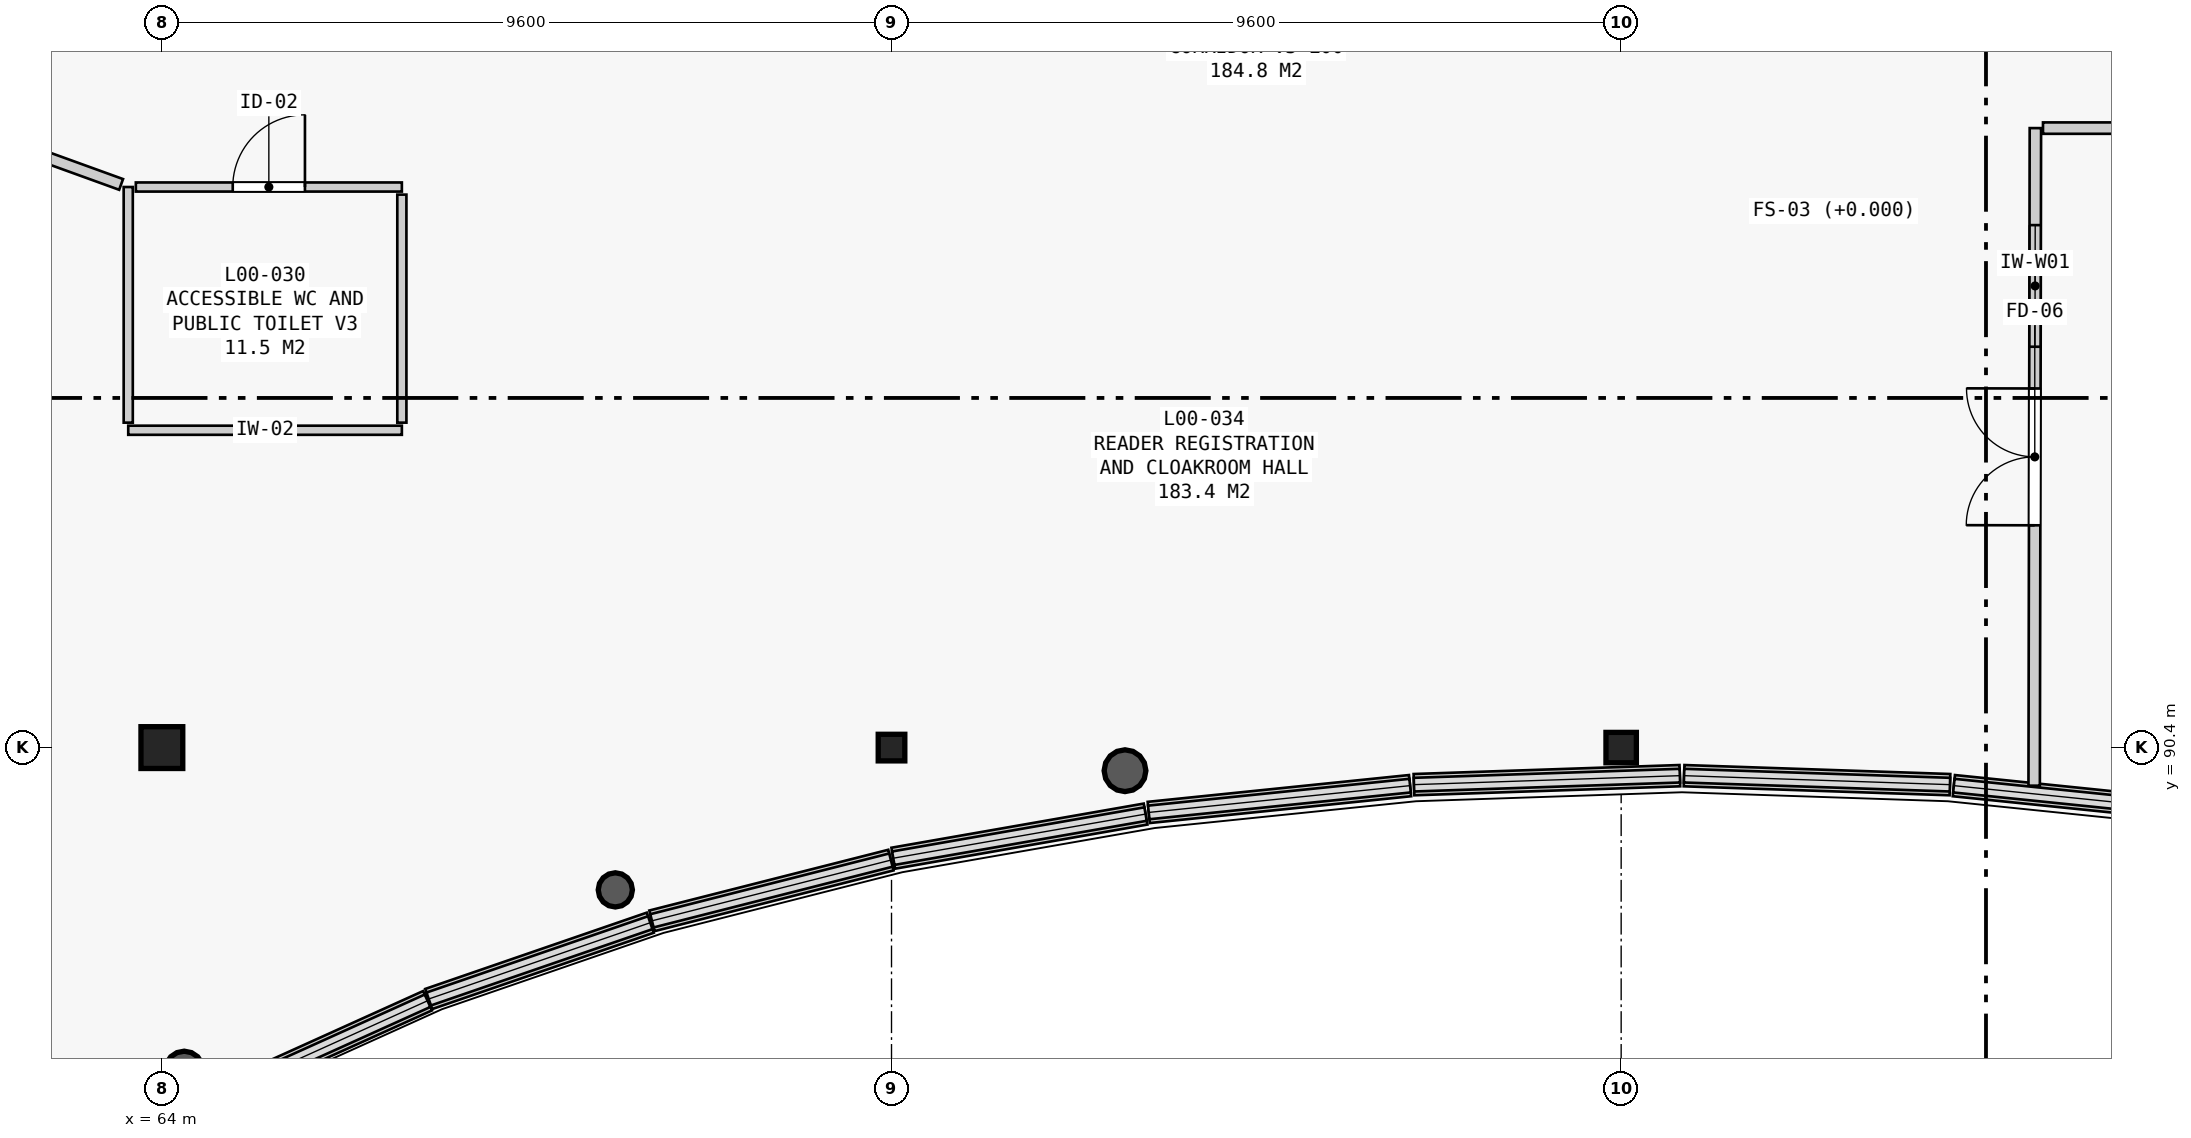
"""IFC4 building model, lengths in metres.
Left out: names, types, materials, properties, quantities, classifications, styles, units other than length and angle.
Written with IfcOpenShell. Run it as: python <this file> out.ifc"""

import sys

from ifc_helpers import new_model, si_unit, direction, frame, frame_2d, origin, origin_2d, place, context, subcontext, project, spatial, rectangle, circle, extrude, element, fill, save


model = new_model("IFC4")
c1 = context("Model", 3, precision=1e-05, world=origin(), true_north=direction((0.0, 1.0)))
c2 = subcontext(c1, "Body", "Model", "MODEL_VIEW")
j1 = project(units=[si_unit("LENGTHUNIT", "METRE"), si_unit("PLANEANGLEUNIT", "RADIAN")], contexts=[c1])
p1 = place(None, origin())
s1 = spatial("IfcSite", under=j1, at=p1, CompositionType="ELEMENT")
p2 = place(p1, origin())
s2 = spatial("IfcBuilding", under=s1, at=p2, CompositionType="ELEMENT")
p3 = place(p2, origin())
s3 = spatial("IfcBuildingStorey", under=s2, at=p3, CompositionType="ELEMENT", Elevation=0.0)
p4 = place(p3, frame((64.0, 90.4, 0.0), z_axis=(0.0, 0.0, 1.0), x_axis=(1.0, 0.0, 0.0)))
e1 = element("IfcColumn", 1, at=p4, inside=s3, PredefinedType="COLUMN", context=c2, shape_type="SweptSolid", body=[
    extrude(rectangle(XDim=0.55, YDim=0.55, at=origin_2d()), origin(), (0.0, 0.0, 1.0), 5.4),
])
p5 = place(p3, frame((73.6, 90.4, 0.0), z_axis=(0.0, 0.0, 1.0), x_axis=(1.0, 0.0, 0.0)))
e2 = element("IfcColumn", 2, at=p5, inside=s3, PredefinedType="COLUMN", context=c2, shape_type="SweptSolid", body=[
    extrude(rectangle(XDim=0.35, YDim=0.35, at=origin_2d()), origin(), (0.0, 0.0, 1.0), 5.4),
])
p6 = place(p3, frame((83.2, 90.4, 0.0), z_axis=(0.0, 0.0, 1.0), x_axis=(1.0, 0.0, 0.0)))
e3 = element("IfcColumn", 3, at=p6, inside=s3, PredefinedType="COLUMN", context=c2, shape_type="SweptSolid", body=[
    extrude(rectangle(XDim=0.4, YDim=0.4, at=origin_2d()), origin(), (0.0, 0.0, 1.0), 5.4),
])
p7 = place(p3, frame((76.672, 90.096, 0.0), z_axis=(0.0, 0.0, 1.0), x_axis=(1.0, 0.0, 0.0)))
e4 = element("IfcColumn", 4, at=p7, inside=s3, PredefinedType="COLUMN", context=c2, shape_type="SweptSolid", body=[
    extrude(circle(Radius=0.275, at=origin_2d()), origin(), (0.0, 0.0, 1.0), 5.4),
])
p8 = place(p3, frame((69.966, 88.528, 0.0), z_axis=(0.0, 0.0, 1.0), x_axis=(1.0, 0.0, 0.0)))
e5 = element("IfcColumn", 5, at=p8, inside=s3, PredefinedType="COLUMN", context=c2, shape_type="SweptSolid", body=[
    extrude(circle(Radius=0.225, at=origin_2d()), origin(), (0.0, 0.0, 1.0), 5.4),
])
p9 = place(p3, frame((64.294, 86.156, 0.0), z_axis=(0.0, 0.0, 1.0), x_axis=(1.0, 0.0, 0.0)))
e6 = element("IfcColumn", 6, at=p9, inside=s3, PredefinedType="COLUMN", context=c2, shape_type="SweptSolid", body=[
    extrude(circle(Radius=0.25, at=origin_2d()), origin(), (0.0, 0.0, 1.0), 5.4),
])
p10 = place(p3, frame((91.016, 89.547, 0.0), z_axis=(0.0, 0.0, 1.0), x_axis=(-0.994784379501, 0.102000187744, 0.0)))
e7 = element("IfcWall", 7, at=p10, inside=s3, PredefinedType="STANDARD", context=c2, shape_type="SweptSolid", body=[
    extrude(rectangle(XDim=3.456, YDim=0.28, at=frame_2d((1.728, 0.0))), origin(), (0.0, 0.0, 1.0), 0.72),
])
for number, where, z_axis, x_axis in (
    (8, (87.526, 89.912, 0.0), (0.0, 0.0, 1.0), (-0.999, 0.034, 0.0)),
    (9, (83.972, 90.031, 0.0), (0.0, 0.0, 1.0), (-0.999, -0.034, 0.0)),
):
    element("IfcWall", number, at=place(p3, frame(where, z_axis=z_axis, x_axis=x_axis)), inside=s3, PredefinedType="STANDARD", context=c2, shape_type="SweptSolid", body=[
        extrude(rectangle(XDim=3.5, YDim=0.28, at=frame_2d((1.75, 0.0))), origin(), (0.0, 0.0, 1.0), 0.72),
    ])
p11 = place(p3, frame((80.423, 89.899, 0.0), z_axis=(0.0, 0.0, 1.0), x_axis=(-0.994784379501, -0.102000187744, 0.0)))
e10 = element("IfcWall", 10, at=p11, inside=s3, PredefinedType="STANDARD", context=c2, shape_type="SweptSolid", body=[
    extrude(rectangle(XDim=3.456, YDim=0.28, at=frame_2d((1.728, 0.0))), origin(), (0.0, 0.0, 1.0), 0.72),
])
p12 = place(p3, frame((76.943, 89.525, 0.0), z_axis=(0.0, 0.0, 1.0), x_axis=(-0.985036309647, -0.172346942756, 0.0)))
e11 = element("IfcWall", 11, at=p12, inside=s3, PredefinedType="STANDARD", context=c2, shape_type="SweptSolid", body=[
    extrude(rectangle(XDim=3.37, YDim=0.28, at=frame_2d((1.685, 0.0))), origin(), (0.0, 0.0, 1.0), 0.72),
])
p13 = place(p3, frame((73.592, 88.92, 0.0), z_axis=(0.0, 0.0, 1.0), x_axis=(-0.969187718636, -0.246323295783, 0.0)))
e12 = element("IfcWall", 12, at=p13, inside=s3, PredefinedType="STANDARD", context=c2, shape_type="SweptSolid", body=[
    extrude(rectangle(XDim=3.244, YDim=0.28, at=frame_2d((1.622, 0.0))), origin(), (0.0, 0.0, 1.0), 0.72),
])
p14 = place(p3, frame((70.426, 88.096, 0.0), z_axis=(0.0, 0.0, 1.0), x_axis=(-0.945492423857, -0.325644094723, 0.0)))
e13 = element("IfcWall", 13, at=p14, inside=s3, PredefinedType="STANDARD", context=c2, shape_type="SweptSolid", body=[
    extrude(rectangle(XDim=3.083, YDim=0.28, at=frame_2d((1.542, 0.0))), origin(), (0.0, 0.0, 1.0), 0.72),
])
p15 = place(p3, frame((67.496, 87.07, 0.0), z_axis=(0.0, 0.0, 1.0), x_axis=(-0.911231648639, -0.411894261333, 0.0)))
e14 = element("IfcWall", 14, at=p15, inside=s3, PredefinedType="STANDARD", context=c2, shape_type="SweptSolid", body=[
    extrude(rectangle(XDim=2.893, YDim=0.28, at=frame_2d((1.446, 0.0))), origin(), (0.0, 0.0, 1.0), 0.72),
])
p16 = place(p3, frame((67.157, 94.575, 0.0), z_axis=(0.0, 0.0, 1.0), x_axis=(-1.0, 0.0, 0.0)))
e15 = element("IfcWall", 15, at=p16, inside=s3, PredefinedType="PARTITIONING", context=c2, shape_type="SweptSolid", body=[
    extrude(rectangle(XDim=3.6, YDim=0.12, at=frame_2d((1.8, 0.0))), origin(), (0.0, 0.0, 1.0), 4.4),
])
p17 = place(p3, frame((63.558, 94.675, 0.0), z_axis=(0.0, 0.0, 1.0), x_axis=(0.0, 1.0, 0.0)))
e16 = element("IfcWall", 16, at=p17, inside=s3, PredefinedType="PARTITIONING", context=c2, shape_type="SweptSolid", body=[
    extrude(rectangle(XDim=3.1, YDim=0.12, at=frame_2d((1.55, 0.0))), origin(), (0.0, 0.0, 1.0), 5.12),
])
p18 = place(p3, frame((63.657, 97.775, 0.0), z_axis=(0.0, 0.0, 1.0), x_axis=(1.0, 0.0, 0.0)))
e17 = element("IfcWall", 17, at=p18, inside=s3, PredefinedType="PARTITIONING", context=c2, shape_type="SweptSolid", body=[
    extrude(rectangle(XDim=3.5, YDim=0.12, at=frame_2d((1.75, 0.0))), origin(), (0.0, 0.0, 1.0), 4.4),
])
p19 = place(p18, frame((1.275, 0.0, 0.0)))
e18 = element("IfcOpeningElement", 18, at=p19, cuts=e17, PredefinedType="OPENING", context=c2, shape_type="SweptSolid", body=[
    extrude(rectangle(XDim=0.95, YDim=2.15, at=frame_2d((0.475, 1.075))), frame((0.0, 0.07, 0.0), z_axis=(0.0, -1.0, 0.0), x_axis=(1.0, 0.0, 0.0)), (0.0, 0.0, 1.0), 0.14),
])
p20 = place(p3, frame((67.157, 97.675, 0.0), z_axis=(0.0, 0.0, 1.0), x_axis=(0.0, -1.0, 0.0)))
e19 = element("IfcWall", 19, at=p20, inside=s3, PredefinedType="PARTITIONING", context=c2, shape_type="SweptSolid", body=[
    extrude(rectangle(XDim=3.0, YDim=0.12, at=frame_2d((1.5, 0.0))), origin(), (0.0, 0.0, 1.0), 5.12),
])
p21 = place(p3, frame((61.775, 98.42, 0.0), z_axis=(0.0, 0.0, 1.0), x_axis=(0.940355866942, -0.340192362506, 0.0)))
e20 = element("IfcWall", 20, at=p21, inside=s3, PredefinedType="PARTITIONING", context=c2, shape_type="SweptSolid", body=[
    extrude(rectangle(XDim=1.796, YDim=0.15, at=frame_2d((0.898, 0.0))), origin(), (0.0, 0.0, 1.0), 5.12),
])
p22 = place(p3, frame((88.634, 89.899, 0.0), z_axis=(0.0, 0.0, 1.0), x_axis=(0.00186256203, 0.99999826543, 0.0)))
e21 = element("IfcWall", 21, at=p22, inside=s3, PredefinedType="PARTITIONING", context=c2, shape_type="SweptSolid", body=[
    extrude(rectangle(XDim=8.651, YDim=0.15, at=frame_2d((4.326, 0.0))), origin(), (0.0, 0.0, 1.0), 4.42),
])
p23 = place(p22, frame((3.426, 0.0, 0.0)))
e22 = element("IfcOpeningElement", 22, at=p23, cuts=e21, PredefinedType="OPENING", context=c2, shape_type="SweptSolid", body=[
    extrude(rectangle(XDim=1.8, YDim=2.2, at=frame_2d((0.9, 1.1))), frame((0.0, 0.085, 0.0), z_axis=(0.0, -1.0, 0.0), x_axis=(1.0, 0.0, 0.0)), (0.0, 0.0, 1.0), 0.17),
])
p24 = place(p22, frame((5.775, 0.0, 1.05)))
e23 = element("IfcOpeningElement", 23, at=p24, cuts=e21, PredefinedType="OPENING", context=c2, shape_type="SweptSolid", body=[
    extrude(rectangle(XDim=1.6, YDim=1.5, at=frame_2d((0.8, 0.75))), frame((0.0, 0.085, 0.0), z_axis=(0.0, -1.0, 0.0), x_axis=(1.0, 0.0, 0.0)), (0.0, 0.0, 1.0), 0.17),
])
p25 = place(p3, frame((88.75, 98.55, 0.0), z_axis=(0.0, 0.0, 1.0), x_axis=(1.0, 0.0, 0.0)))
e24 = element("IfcWall", 24, at=p25, inside=s3, PredefinedType="PARTITIONING", context=c2, shape_type="SweptSolid", body=[
    extrude(rectangle(XDim=1.75, YDim=0.15, at=frame_2d((0.875, 0.0))), origin(), (0.0, 0.0, 1.0), 5.12),
])
p26 = place(p19, origin())
e25 = element("IfcDoor", 25, at=p26, inside=s3, OperationType="SINGLE_SWING_RIGHT", PredefinedType="DOOR", context=c2, shape_type="SweptSolid", body=[
    extrude(rectangle(XDim=0.95, YDim=2.15, at=frame_2d((0.475, 1.075))), frame((0.0, 0.025, 0.0), z_axis=(0.0, -1.0, 0.0), x_axis=(1.0, 0.0, 0.0)), (0.0, 0.0, 1.0), 0.05),
])
fill(e18, e25)
p27 = place(p23, origin())
e26 = element("IfcDoor", 26, at=p27, inside=s3, OperationType="DOUBLE_DOOR_SINGLE_SWING", PredefinedType="DOOR", context=c2, shape_type="SweptSolid", body=[
    extrude(rectangle(XDim=1.8, YDim=2.2, at=frame_2d((0.9, 1.1))), frame((0.0, 0.025, 0.0), z_axis=(0.0, -1.0, 0.0), x_axis=(1.0, 0.0, 0.0)), (0.0, 0.0, 1.0), 0.05),
])
fill(e22, e26)
p28 = place(p24, origin())
e27 = element("IfcWindow", 27, at=p28, inside=s3, PartitioningType="SINGLE_PANEL", PredefinedType="WINDOW", context=c2, shape_type="SweptSolid", body=[
    extrude(rectangle(XDim=1.6, YDim=1.5, at=frame_2d((0.8, 0.75))), frame((0.0, 0.03, 0.0), z_axis=(0.0, -1.0, 0.0), x_axis=(1.0, 0.0, 0.0)), (0.0, 0.0, 1.0), 0.06),
])
fill(e23, e27)
save(model, sys.argv[1])
